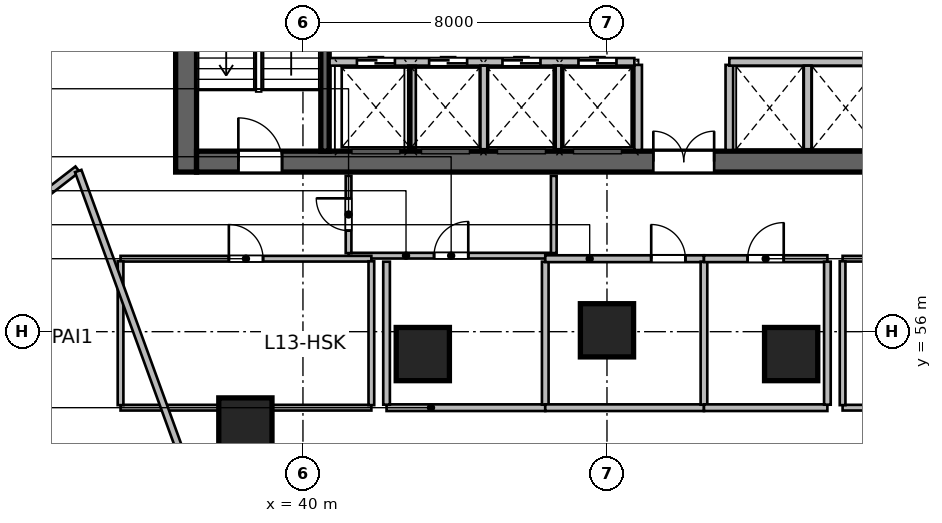
"""IFC4 building model, lengths in metres.
Left out: names, types, materials, properties, quantities, classifications, styles, units other than length and angle.
Written with IfcOpenShell. Run it as: python <this file> out.ifc"""

import sys

from ifc_helpers import new_model, si_unit, direction, frame, frame_2d, origin, origin_2d, place, context, subcontext, project, spatial, rectangle, circle, extrude, source, transform, mapped, element, fill, save


model = new_model("IFC4")
c1 = context("Model", 3, precision=1e-05, world=origin(), true_north=direction((0.0, 1.0)))
c2 = subcontext(c1, "Body", "Model", "MODEL_VIEW")
j1 = project(units=[si_unit("LENGTHUNIT", "METRE"), si_unit("PLANEANGLEUNIT", "RADIAN")], contexts=[c1])
p1 = place(None, origin())
s1 = spatial("IfcSite", under=j1, at=p1, CompositionType="ELEMENT")
p2 = place(p1, origin())
s2 = spatial("IfcBuilding", under=s1, at=p2, CompositionType="ELEMENT")
p3 = place(p2, frame((0.0, 0.0, 60.6)))
s3 = spatial("IfcBuildingStorey", under=s2, at=p3, CompositionType="ELEMENT", Elevation=60.6)
m1 = source(origin(), c2, "Body", "SweptSolid", [
    extrude(rectangle(XDim=12.0, YDim=0.55, at=frame_2d((6.0, 0.0))), origin(), (0.0, 0.0, 1.0), 3.6),
])
p4 = place(p3, frame((36.925, 60.2, 0.0), z_axis=(0.0, 0.0, 1.0), x_axis=(0.0, 1.0, 0.0)))
e1 = element("IfcWall", 1, at=p4, inside=s3, PredefinedType="SHEAR", context=c2, shape_type="MappedRepresentation", body=[
    mapped(m1, transform((0.0, 0.0, 0.0), scale=1.0)),
])
m2 = source(origin(), c2, "Body", "SweptSolid", [
    extrude(rectangle(XDim=21.6, YDim=0.55, at=frame_2d((10.8, 0.0))), origin(), (0.0, 0.0, 1.0), 3.6),
])
p5 = place(p3, frame((37.2, 60.475, 0.0), z_axis=(0.0, 0.0, 1.0), x_axis=(1.0, 0.0, 0.0)))
e2 = element("IfcWall", 2, at=p5, inside=s3, PredefinedType="SHEAR", context=c2, shape_type="MappedRepresentation", body=[
    mapped(m2, transform((0.0, 0.0, 0.0), scale=1.0)),
])
p6 = place(p5, frame((1.1, 0.0, 0.0)))
e3 = element("IfcOpeningElement", 3, at=p6, cuts=e2, PredefinedType="OPENING", context=c2, shape_type="SweptSolid", body=[
    extrude(rectangle(XDim=1.15, YDim=2.15, at=frame_2d((0.575, 1.075))), frame((0.0, 0.285, 0.0), z_axis=(0.0, -1.0, 0.0), x_axis=(1.0, 0.0, 0.0)), (0.0, 0.0, 1.0), 0.57),
])
p7 = place(p5, frame((19.5, 0.0, 0.0)))
e4 = element("IfcOpeningElement", 4, at=p7, cuts=e2, PredefinedType="OPENING", context=c2, shape_type="SweptSolid", body=[
    extrude(rectangle(XDim=0.9, YDim=2.1, at=frame_2d((0.45, 1.05))), frame((0.0, 0.285, 0.0), z_axis=(0.0, -1.0, 0.0), x_axis=(1.0, 0.0, 0.0)), (0.0, 0.0, 1.0), 0.57),
])
p8 = place(p5, frame((12.02, 0.0, 0.0)))
e5 = element("IfcOpeningElement", 5, at=p8, cuts=e2, PredefinedType="OPENING", context=c2, shape_type="SweptSolid", body=[
    extrude(rectangle(XDim=1.6, YDim=2.15, at=frame_2d((0.8, 1.075))), frame((0.0, 0.285, 0.0), z_axis=(0.0, -1.0, 0.0), x_axis=(1.0, 0.0, 0.0)), (0.0, 0.0, 1.0), 0.57),
])
m3 = source(origin(), c2, "Body", "SweptSolid", [
    extrude(rectangle(XDim=10.9, YDim=0.22, at=frame_2d((5.45, 0.0))), origin(), (0.0, 0.0, 1.0), 3.6),
])
p9 = place(p3, frame((40.58, 60.75, 0.0), z_axis=(0.0, 0.0, 1.0), x_axis=(0.0, 1.0, 0.0)))
e6 = element("IfcWall", 6, at=p9, inside=s3, PredefinedType="SHEAR", context=c2, shape_type="MappedRepresentation", body=[
    mapped(m3, transform((0.0, 0.0, 0.0), scale=1.0)),
])
m4 = source(origin(), c2, "Body", "SweptSolid", [
    extrude(circle(Radius=0.7, at=origin_2d()), origin(), (0.0, 0.0, 1.0), 3.6),
])
for number, where, z_axis, x_axis in (
    (7, (38.485, 53.558, 0.0), (0.0, 0.0, 1.0), (-0.289, 0.957, 0.0)),
    (8, (43.154, 55.411, 0.0), (0.0, 0.0, 1.0), (-0.143, 0.99, 0.0)),
    (9, (48.0, 56.036, 0.0), (0.0, 0.0, 1.0), (0.0, 1.0, 0.0)),
    (10, (52.846, 55.411, 0.0), (0.0, 0.0, 1.0), (0.143, 0.99, 0.0)),
):
    element("IfcColumn", number, at=place(p3, frame(where, z_axis=z_axis, x_axis=x_axis)), inside=s3, PredefinedType="COLUMN", context=c2, shape_type="MappedRepresentation", body=[
        mapped(m4, transform((0.0, 0.0, 0.0), scale=1.0)),
    ])
m5 = source(origin(), c2, "Body", "SweptSolid", [
    extrude(rectangle(XDim=2.24, YDim=0.2, at=frame_2d((1.12, 0.0))), origin(), (0.0, 0.0, 1.0), 3.36),
])
for number, where, z_axis, x_axis in (
    (11, (48.82, 60.78, 0.0), (0.0, 0.0, 1.0), (0.0, 1.0, 0.0)),
    (12, (51.22, 60.78, 0.0), (0.0, 0.0, 1.0), (0.0, 1.0, 0.0)),
):
    element("IfcWall", number, at=place(p3, frame(where, z_axis=z_axis, x_axis=x_axis)), inside=s3, PredefinedType="SOLIDWALL", context=c2, shape_type="MappedRepresentation", body=[
        mapped(m5, transform((0.0, 0.0, 0.0), scale=1.0)),
    ])
m6 = source(origin(), c2, "Body", "SweptSolid", [
    extrude(rectangle(XDim=8.02, YDim=0.2, at=frame_2d((4.01, 0.0))), origin(), (0.0, 0.0, 1.0), 3.36),
])
p10 = place(p3, frame((40.7, 63.1, 0.0), z_axis=(0.0, 0.0, 1.0), x_axis=(1.0, 0.0, 0.0)))
e13 = element("IfcWall", 13, at=p10, inside=s3, PredefinedType="SOLIDWALL", context=c2, shape_type="MappedRepresentation", body=[
    mapped(m6, transform((0.0, 0.0, 0.0), scale=1.0)),
])
p11 = place(p10, frame((0.72, 0.0, 0.0)))
e14 = element("IfcOpeningElement", 14, at=p11, cuts=e13, PredefinedType="OPENING", context=c2, shape_type="SweptSolid", body=[
    extrude(rectangle(XDim=1.0, YDim=2.15, at=frame_2d((0.5, 1.075))), frame((0.0, 0.11, 0.0), z_axis=(0.0, -1.0, 0.0), x_axis=(1.0, 0.0, 0.0)), (0.0, 0.0, 1.0), 0.22),
])
p12 = place(p10, frame((2.62, 0.0, 0.0)))
e15 = element("IfcOpeningElement", 15, at=p12, cuts=e13, PredefinedType="OPENING", context=c2, shape_type="SweptSolid", body=[
    extrude(rectangle(XDim=1.0, YDim=2.15, at=frame_2d((0.5, 1.075))), frame((0.0, 0.11, 0.0), z_axis=(0.0, -1.0, 0.0), x_axis=(1.0, 0.0, 0.0)), (0.0, 0.0, 1.0), 0.22),
])
p13 = place(p10, frame((4.55, 0.0, 0.0)))
e16 = element("IfcOpeningElement", 16, at=p13, cuts=e13, PredefinedType="OPENING", context=c2, shape_type="SweptSolid", body=[
    extrude(rectangle(XDim=1.0, YDim=2.15, at=frame_2d((0.5, 1.075))), frame((0.0, 0.11, 0.0), z_axis=(0.0, -1.0, 0.0), x_axis=(1.0, 0.0, 0.0)), (0.0, 0.0, 1.0), 0.22),
])
p14 = place(p10, frame((6.55, 0.0, 0.0)))
e17 = element("IfcOpeningElement", 17, at=p14, cuts=e13, PredefinedType="OPENING", context=c2, shape_type="SweptSolid", body=[
    extrude(rectangle(XDim=1.0, YDim=2.15, at=frame_2d((0.5, 1.075))), frame((0.0, 0.11, 0.0), z_axis=(0.0, -1.0, 0.0), x_axis=(1.0, 0.0, 0.0)), (0.0, 0.0, 1.0), 0.22),
])
m7 = source(origin(), c2, "Body", "SweptSolid", [
    extrude(rectangle(XDim=4.1, YDim=0.2, at=frame_2d((2.05, 0.0))), origin(), (0.0, 0.0, 1.0), 3.36),
])
p15 = place(p3, frame((51.22, 63.1, 0.0), z_axis=(0.0, 0.0, 1.0), x_axis=(1.0, 0.0, 0.0)))
e18 = element("IfcWall", 18, at=p15, inside=s3, PredefinedType="SOLIDWALL", context=c2, shape_type="MappedRepresentation", body=[
    mapped(m7, transform((0.0, 0.0, 0.0), scale=1.0)),
])
m8 = source(origin(), c2, "Body", "SweptSolid", [
    extrude(rectangle(XDim=2.2, YDim=0.2, at=frame_2d((1.1, 0.0))), origin(), (0.0, 0.0, 1.0), 3.36),
])
for number, where, z_axis, x_axis in (
    (19, (42.87, 60.8, 0.0), (0.0, 0.0, 1.0), (0.0, 1.0, 0.0)),
    (20, (44.77, 60.8, 0.0), (0.0, 0.0, 1.0), (0.0, 1.0, 0.0)),
    (21, (46.7, 60.8, 0.0), (0.0, 0.0, 1.0), (0.0, 1.0, 0.0)),
    (22, (53.28, 60.8, 0.0), (0.0, 0.0, 1.0), (0.0, 1.0, 0.0)),
):
    element("IfcWall", number, at=place(p3, frame(where, z_axis=z_axis, x_axis=x_axis)), inside=s3, PredefinedType="SOLIDWALL", context=c2, shape_type="MappedRepresentation", body=[
        mapped(m8, transform((0.0, 0.0, 0.0), scale=1.0)),
    ])
m9 = source(origin(), c2, "Body", "SweptSolid", [
    extrude(rectangle(XDim=5.4, YDim=0.15, at=frame_2d((2.7, 0.0))), origin(), (0.0, 0.0, 1.0), 3.36),
])
p16 = place(p3, frame((41.2, 58.0, 0.0), z_axis=(0.0, 0.0, 1.0), x_axis=(1.0, 0.0, 0.0)))
e23 = element("IfcWall", 23, at=p16, inside=s3, PredefinedType="PARTITIONING", context=c2, shape_type="MappedRepresentation", body=[
    mapped(m9, transform((0.0, 0.0, 0.0), scale=1.0)),
])
p17 = place(p16, frame((2.25, 0.0, 0.0)))
e24 = element("IfcOpeningElement", 24, at=p17, cuts=e23, PredefinedType="OPENING", context=c2, shape_type="SweptSolid", body=[
    extrude(rectangle(XDim=0.9, YDim=2.08, at=frame_2d((0.45, 1.04))), frame((0.0, 0.085, 0.0), z_axis=(0.0, -1.0, 0.0), x_axis=(1.0, 0.0, 0.0)), (0.0, 0.0, 1.0), 0.17),
])
m10 = source(origin(), c2, "Body", "SweptSolid", [
    extrude(rectangle(XDim=2.033, YDim=0.15, at=frame_2d((1.016, 0.0))), origin(), (0.0, 0.0, 1.0), 3.36),
])
p18 = place(p3, frame((41.2, 58.067, 0.0), z_axis=(0.0, 0.0, 1.0), x_axis=(0.0, 1.0, 0.0)))
e25 = element("IfcWall", 25, at=p18, inside=s3, PredefinedType="PARTITIONING", context=c2, shape_type="MappedRepresentation", body=[
    mapped(m10, transform((0.0, 0.0, 0.0), scale=1.0)),
])
p19 = place(p18, frame((0.591, 0.0, 0.0)))
e26 = element("IfcOpeningElement", 26, at=p19, cuts=e25, PredefinedType="OPENING", context=c2, shape_type="SweptSolid", body=[
    extrude(rectangle(XDim=0.85, YDim=2.1, at=frame_2d((0.425, 1.05))), frame((0.0, 0.085, 0.0), z_axis=(0.0, -1.0, 0.0), x_axis=(1.0, 0.0, 0.0)), (0.0, 0.0, 1.0), 0.17),
])
p20 = place(p3, frame((46.6, 58.067, 0.0), z_axis=(0.0, 0.0, 1.0), x_axis=(0.0, 1.0, 0.0)))
e27 = element("IfcWall", 27, at=p20, inside=s3, PredefinedType="PARTITIONING", context=c2, shape_type="MappedRepresentation", body=[
    mapped(m10, transform((0.0, 0.0, 0.0), scale=1.0)),
])
m11 = source(origin(), c2, "Body", "SweptSolid", [
    extrude(rectangle(XDim=6.6, YDim=0.15, at=frame_2d((3.3, 0.0))), origin(), (0.0, 0.0, 1.0), 2.803),
])
p21 = place(p3, frame((35.2, 54.0, 0.0), z_axis=(0.0, 0.0, 1.0), x_axis=(1.0, 0.0, 0.0)))
e28 = element("IfcWall", 28, at=p21, inside=s3, PredefinedType="PARTITIONING", context=c2, shape_type="MappedRepresentation", body=[
    mapped(m11, transform((0.0, 0.0, 0.0), scale=1.0)),
])
m12 = source(origin(), c2, "Body", "SweptSolid", [
    extrude(rectangle(XDim=6.6, YDim=0.15, at=frame_2d((3.3, 0.0))), origin(), (0.0, 0.0, 1.0), 3.36),
])
p22 = place(p3, frame((35.2, 57.92, 0.0), z_axis=(0.0, 0.0, 1.0), x_axis=(1.0, 0.0, 0.0)))
e29 = element("IfcWall", 29, at=p22, inside=s3, PredefinedType="PARTITIONING", context=c2, shape_type="MappedRepresentation", body=[
    mapped(m12, transform((0.0, 0.0, 0.0), scale=1.0)),
])
p23 = place(p22, frame((2.85, 0.0, 0.0)))
e30 = element("IfcOpeningElement", 30, at=p23, cuts=e29, PredefinedType="OPENING", context=c2, shape_type="SweptSolid", body=[
    extrude(rectangle(XDim=0.9, YDim=2.1, at=frame_2d((0.45, 1.05))), frame((0.0, 0.085, 0.0), z_axis=(0.0, -1.0, 0.0), x_axis=(1.0, 0.0, 0.0)), (0.0, 0.0, 1.0), 0.17),
])
m13 = source(origin(), c2, "Body", "SweptSolid", [
    extrude(rectangle(XDim=3.785, YDim=0.15, at=frame_2d((1.893, 0.0))), origin(), (0.0, 0.0, 1.0), 3.36),
])
for number, where, z_axis, x_axis in (
    (31, (35.2, 54.067, 0.0), (0.0, 0.0, 1.0), (0.0, 1.0, 0.0)),
    (32, (41.8, 54.067, 0.0), (0.0, 0.0, 1.0), (0.0, 1.0, 0.0)),
):
    element("IfcWall", number, at=place(p3, frame(where, z_axis=z_axis, x_axis=x_axis)), inside=s3, PredefinedType="PARTITIONING", context=c2, shape_type="MappedRepresentation", body=[
        mapped(m13, transform((0.0, 0.0, 0.0), scale=1.0)),
    ])
m14 = source(origin(), c2, "Body", "SweptSolid", [
    extrude(rectangle(XDim=4.176, YDim=0.175, at=frame_2d((2.088, 0.0))), origin(), (0.0, 0.0, 1.0), 3.36),
])
p24 = place(p3, frame((42.2, 54.0, 0.0), z_axis=(0.0, 0.0, 1.0), x_axis=(1.0, 0.0, 0.0)))
e33 = element("IfcWall", 33, at=p24, inside=s3, PredefinedType="PARTITIONING", context=c2, shape_type="MappedRepresentation", body=[
    mapped(m14, transform((0.0, 0.0, 0.0), scale=1.0)),
])
m15 = source(origin(), c2, "Body", "SweptSolid", [
    extrude(rectangle(XDim=3.763, YDim=0.175, at=frame_2d((1.881, 0.0))), origin(), (0.0, 0.0, 1.0), 3.36),
])
for number, where, z_axis, x_axis in (
    (34, (42.2, 54.079, 0.0), (0.0, 0.0, 1.0), (0.0, 1.0, 0.0)),
    (35, (46.376, 54.079, 0.0), (0.0, 0.0, 1.0), (0.0, 1.0, 0.0)),
):
    element("IfcWall", number, at=place(p3, frame(where, z_axis=z_axis, x_axis=x_axis)), inside=s3, PredefinedType="PARTITIONING", context=c2, shape_type="MappedRepresentation", body=[
        mapped(m15, transform((0.0, 0.0, 0.0), scale=1.0)),
    ])
p25 = place(p3, frame((46.376, 54.0, 0.0), z_axis=(0.0, 0.0, 1.0), x_axis=(1.0, 0.0, 0.0)))
e36 = element("IfcWall", 36, at=p25, inside=s3, PredefinedType="PARTITIONING", context=c2, shape_type="MappedRepresentation", body=[
    mapped(m14, transform((0.0, 0.0, 0.0), scale=1.0)),
])
m16 = source(origin(), c2, "Body", "SweptSolid", [
    extrude(rectangle(XDim=4.176, YDim=0.18, at=frame_2d((2.088, 0.0))), origin(), (0.0, 0.0, 1.0), 3.36),
])
p26 = place(p3, frame((46.376, 57.92, 0.0), z_axis=(0.0, 0.0, 1.0), x_axis=(1.0, 0.0, 0.0)))
e37 = element("IfcWall", 37, at=p26, inside=s3, PredefinedType="PLUMBINGWALL", context=c2, shape_type="MappedRepresentation", body=[
    mapped(m16, transform((0.0, 0.0, 0.0), scale=1.0)),
])
p27 = place(p26, frame((2.788, 0.0, 0.0)))
e38 = element("IfcOpeningElement", 38, at=p27, cuts=e37, PredefinedType="OPENING", context=c2, shape_type="SweptSolid", body=[
    extrude(rectangle(XDim=0.9, YDim=2.08, at=frame_2d((0.45, 1.04))), frame((0.0, 0.1, 0.0), z_axis=(0.0, -1.0, 0.0), x_axis=(1.0, 0.0, 0.0)), (0.0, 0.0, 1.0), 0.2),
])
p28 = place(p3, frame((50.552, 54.079, 0.0), z_axis=(0.0, 0.0, 1.0), x_axis=(0.0, 1.0, 0.0)))
e39 = element("IfcWall", 39, at=p28, inside=s3, PredefinedType="PARTITIONING", context=c2, shape_type="MappedRepresentation", body=[
    mapped(m15, transform((0.0, 0.0, 0.0), scale=1.0)),
])
m17 = source(origin(), c2, "Body", "SweptSolid", [
    extrude(rectangle(XDim=3.248, YDim=0.175, at=frame_2d((1.624, 0.0))), origin(), (0.0, 0.0, 1.0), 3.36),
])
p29 = place(p3, frame((50.552, 54.0, 0.0), z_axis=(0.0, 0.0, 1.0), x_axis=(1.0, 0.0, 0.0)))
e40 = element("IfcWall", 40, at=p29, inside=s3, PredefinedType="PARTITIONING", context=c2, shape_type="MappedRepresentation", body=[
    mapped(m17, transform((0.0, 0.0, 0.0), scale=1.0)),
])
m18 = source(origin(), c2, "Body", "SweptSolid", [
    extrude(rectangle(XDim=3.248, YDim=0.18, at=frame_2d((1.624, 0.0))), origin(), (0.0, 0.0, 1.0), 3.36),
])
p30 = place(p3, frame((50.552, 57.92, 0.0), z_axis=(0.0, 0.0, 1.0), x_axis=(1.0, 0.0, 0.0)))
e41 = element("IfcWall", 41, at=p30, inside=s3, PredefinedType="PLUMBINGWALL", context=c2, shape_type="MappedRepresentation", body=[
    mapped(m18, transform((0.0, 0.0, 0.0), scale=1.0)),
])
p31 = place(p30, frame((1.149, 0.0, 0.0)))
e42 = element("IfcOpeningElement", 42, at=p31, cuts=e41, PredefinedType="OPENING", context=c2, shape_type="SweptSolid", body=[
    extrude(rectangle(XDim=0.95, YDim=2.12, at=frame_2d((0.475, 1.06))), frame((0.0, 0.1, 0.0), z_axis=(0.0, -1.0, 0.0), x_axis=(1.0, 0.0, 0.0)), (0.0, 0.0, 1.0), 0.2),
])
p32 = place(p3, frame((53.8, 54.079, 0.0), z_axis=(0.0, 0.0, 1.0), x_axis=(0.0, 1.0, 0.0)))
e43 = element("IfcWall", 43, at=p32, inside=s3, PredefinedType="PARTITIONING", context=c2, shape_type="MappedRepresentation", body=[
    mapped(m15, transform((0.0, 0.0, 0.0), scale=1.0)),
])
p33 = place(p3, frame((54.2, 54.0, 0.0), z_axis=(0.0, 0.0, 1.0), x_axis=(1.0, 0.0, 0.0)))
e44 = element("IfcWall", 44, at=p33, inside=s3, PredefinedType="PARTITIONING", context=c2, shape_type="MappedRepresentation", body=[
    mapped(m11, transform((0.0, 0.0, 0.0), scale=1.0)),
])
p34 = place(p3, frame((54.2, 57.92, 0.0), z_axis=(0.0, 0.0, 1.0), x_axis=(1.0, 0.0, 0.0)))
e45 = element("IfcWall", 45, at=p34, inside=s3, PredefinedType="PARTITIONING", context=c2, shape_type="MappedRepresentation", body=[
    mapped(m12, transform((0.0, 0.0, 0.0), scale=1.0)),
])
p35 = place(p34, frame((2.825, 0.0, 0.0)))
e46 = element("IfcOpeningElement", 46, at=p35, cuts=e45, PredefinedType="OPENING", context=c2, shape_type="SweptSolid", body=[
    extrude(rectangle(XDim=0.95, YDim=2.1, at=frame_2d((0.475, 1.05))), frame((0.0, 0.085, 0.0), z_axis=(0.0, -1.0, 0.0), x_axis=(1.0, 0.0, 0.0)), (0.0, 0.0, 1.0), 0.17),
])
p36 = place(p3, frame((54.2, 54.067, 0.0), z_axis=(0.0, 0.0, 1.0), x_axis=(0.0, 1.0, 0.0)))
e47 = element("IfcWall", 47, at=p36, inside=s3, PredefinedType="PARTITIONING", context=c2, shape_type="MappedRepresentation", body=[
    mapped(m13, transform((0.0, 0.0, 0.0), scale=1.0)),
])
m19 = source(origin(), c2, "Body", "SweptSolid", [
    extrude(rectangle(XDim=4.855, YDim=0.18, at=frame_2d((2.427, 0.0))), origin(), (0.0, 0.0, 1.0), 3.36),
])
p37 = place(p3, frame((30.229, 57.305, 0.0), z_axis=(0.0, 0.0, 1.0), x_axis=(0.790930965655, 0.611905391028, 0.0)))
e48 = element("IfcWall", 48, at=p37, inside=s3, PredefinedType="PLUMBINGWALL", context=c2, shape_type="MappedRepresentation", body=[
    mapped(m19, transform((0.0, 0.0, 0.0), scale=1.0)),
])
p38 = place(p37, frame((1.952, 0.0, 0.0)))
e49 = element("IfcOpeningElement", 49, at=p38, cuts=e48, PredefinedType="OPENING", context=c2, shape_type="SweptSolid", body=[
    extrude(rectangle(XDim=0.95, YDim=2.1, at=frame_2d((0.475, 1.05))), frame((0.0, 0.1, 0.0), z_axis=(0.0, -1.0, 0.0), x_axis=(1.0, 0.0, 0.0)), (0.0, 0.0, 1.0), 0.2),
])
m20 = source(origin(), c2, "Body", "SweptSolid", [
    extrude(rectangle(XDim=11.811, YDim=0.18, at=frame_2d((5.906, 0.0))), origin(), (0.0, 0.0, 1.0), 3.36),
])
p39 = place(p3, frame((35.562, 46.71, 0.0), z_axis=(0.0, 0.0, 1.0), x_axis=(-0.449626289102, 0.893216771086, 0.0)))
e50 = element("IfcWall", 50, at=p39, inside=s3, PredefinedType="PLUMBINGWALL", context=c2, shape_type="MappedRepresentation", body=[
    mapped(m20, transform((0.0, 0.0, 0.0), scale=1.0)),
])
m21 = source(origin(), c2, "Body", "SweptSolid", [
    extrude(rectangle(XDim=12.196, YDim=0.18, at=frame_2d((6.098, 0.0))), origin(), (0.0, 0.0, 1.0), 3.36),
])
p40 = place(p3, frame((38.258, 48.766, 0.0), z_axis=(0.0, 0.0, 1.0), x_axis=(-0.342022711534, 0.939691686031, 0.0)))
e51 = element("IfcWall", 51, at=p40, inside=s3, PredefinedType="PLUMBINGWALL", context=c2, shape_type="MappedRepresentation", body=[
    mapped(m21, transform((0.0, 0.0, 0.0), scale=1.0)),
])
m22 = source(origin(), c2, "Body", "SweptSolid", [
    extrude(rectangle(XDim=1.15, YDim=2.15, at=frame_2d((0.575, 1.075))), frame((0.0, 0.025, 0.0), z_axis=(0.0, -1.0, 0.0), x_axis=(1.0, 0.0, 0.0)), (0.0, 0.0, 1.0), 0.05),
])
p41 = place(p6, origin())
e52 = element("IfcDoor", 52, at=p41, inside=s3, OperationType="SINGLE_SWING_LEFT", PredefinedType="DOOR", context=c2, shape_type="MappedRepresentation", body=[
    mapped(m22, transform((0.0, 0.0, 0.0), scale=1.0)),
])
fill(e3, e52)
m23 = source(origin(), c2, "Body", "SweptSolid", [
    extrude(rectangle(XDim=1.6, YDim=2.15, at=frame_2d((0.8, 1.075))), frame((0.0, 0.025, 0.0), z_axis=(0.0, -1.0, 0.0), x_axis=(1.0, 0.0, 0.0)), (0.0, 0.0, 1.0), 0.05),
])
p42 = place(p8, origin())
e53 = element("IfcDoor", 53, at=p42, inside=s3, OperationType="DOUBLE_DOOR_SINGLE_SWING", PredefinedType="DOOR", context=c2, shape_type="MappedRepresentation", body=[
    mapped(m23, transform((0.0, 0.0, 0.0), scale=1.0)),
])
fill(e5, e53)
m24 = source(origin(), c2, "Body", "SweptSolid", [
    extrude(rectangle(XDim=1.0, YDim=2.15, at=frame_2d((0.5, 1.075))), frame((0.0, 0.025, 0.0), z_axis=(0.0, -1.0, 0.0), x_axis=(1.0, 0.0, 0.0)), (0.0, 0.0, 1.0), 0.05),
])
p43 = place(p11, origin())
e54 = element("IfcDoor", 54, at=p43, inside=s3, OperationType="DOUBLE_DOOR_SLIDING", PredefinedType="DOOR", context=c2, shape_type="MappedRepresentation", body=[
    mapped(m24, transform((0.0, 0.0, 0.0), scale=1.0)),
])
fill(e14, e54)
p44 = place(p12, origin())
e55 = element("IfcDoor", 55, at=p44, inside=s3, OperationType="DOUBLE_DOOR_SLIDING", PredefinedType="DOOR", context=c2, shape_type="MappedRepresentation", body=[
    mapped(m24, transform((0.0, 0.0, 0.0), scale=1.0)),
])
fill(e15, e55)
p45 = place(p13, origin())
e56 = element("IfcDoor", 56, at=p45, inside=s3, OperationType="DOUBLE_DOOR_SLIDING", PredefinedType="DOOR", context=c2, shape_type="MappedRepresentation", body=[
    mapped(m24, transform((0.0, 0.0, 0.0), scale=1.0)),
])
fill(e16, e56)
p46 = place(p14, origin())
e57 = element("IfcDoor", 57, at=p46, inside=s3, OperationType="DOUBLE_DOOR_SLIDING", PredefinedType="DOOR", context=c2, shape_type="MappedRepresentation", body=[
    mapped(m24, transform((0.0, 0.0, 0.0), scale=1.0)),
])
fill(e17, e57)
m25 = source(origin(), c2, "Body", "SweptSolid", [
    extrude(rectangle(XDim=0.85, YDim=2.1, at=frame_2d((0.425, 1.05))), frame((0.0, 0.025, 0.0), z_axis=(0.0, -1.0, 0.0), x_axis=(1.0, 0.0, 0.0)), (0.0, 0.0, 1.0), 0.05),
])
p47 = place(p19, origin())
e58 = element("IfcDoor", 58, at=p47, inside=s3, OperationType="SINGLE_SWING_RIGHT", PredefinedType="DOOR", context=c2, shape_type="MappedRepresentation", body=[
    mapped(m25, transform((0.0, 0.0, 0.0), scale=1.0)),
])
fill(e26, e58)
m26 = source(origin(), c2, "Body", "SweptSolid", [
    extrude(rectangle(XDim=0.9, YDim=2.1, at=frame_2d((0.45, 1.05))), frame((0.0, 0.025, 0.0), z_axis=(0.0, -1.0, 0.0), x_axis=(1.0, 0.0, 0.0)), (0.0, 0.0, 1.0), 0.05),
])
p48 = place(p23, origin())
e59 = element("IfcDoor", 59, at=p48, inside=s3, OperationType="SINGLE_SWING_LEFT", PredefinedType="DOOR", context=c2, shape_type="MappedRepresentation", body=[
    mapped(m26, transform((0.0, 0.0, 0.0), scale=1.0)),
])
fill(e30, e59)
m27 = source(origin(), c2, "Body", "SweptSolid", [
    extrude(rectangle(XDim=0.9, YDim=2.08, at=frame_2d((0.45, 1.04))), frame((0.0, 0.025, 0.0), z_axis=(0.0, -1.0, 0.0), x_axis=(1.0, 0.0, 0.0)), (0.0, 0.0, 1.0), 0.05),
])
p49 = place(p17, origin())
e60 = element("IfcDoor", 60, at=p49, inside=s3, OperationType="SINGLE_SWING_RIGHT", PredefinedType="DOOR", context=c2, shape_type="MappedRepresentation", body=[
    mapped(m27, transform((0.0, 0.0, 0.0), scale=1.0)),
])
fill(e24, e60)
p50 = place(p27, origin())
e61 = element("IfcDoor", 61, at=p50, inside=s3, OperationType="SINGLE_SWING_LEFT", PredefinedType="DOOR", context=c2, shape_type="MappedRepresentation", body=[
    mapped(m27, transform((0.0, 0.0, 0.0), scale=1.0)),
])
fill(e38, e61)
m28 = source(origin(), c2, "Body", "SweptSolid", [
    extrude(rectangle(XDim=0.95, YDim=2.12, at=frame_2d((0.475, 1.06))), frame((0.0, 0.025, 0.0), z_axis=(0.0, -1.0, 0.0), x_axis=(1.0, 0.0, 0.0)), (0.0, 0.0, 1.0), 0.05),
])
p51 = place(p31, origin())
e62 = element("IfcDoor", 62, at=p51, inside=s3, OperationType="SINGLE_SWING_RIGHT", PredefinedType="DOOR", context=c2, shape_type="MappedRepresentation", body=[
    mapped(m28, transform((0.0, 0.0, 0.0), scale=1.0)),
])
fill(e42, e62)
save(model, sys.argv[1])
